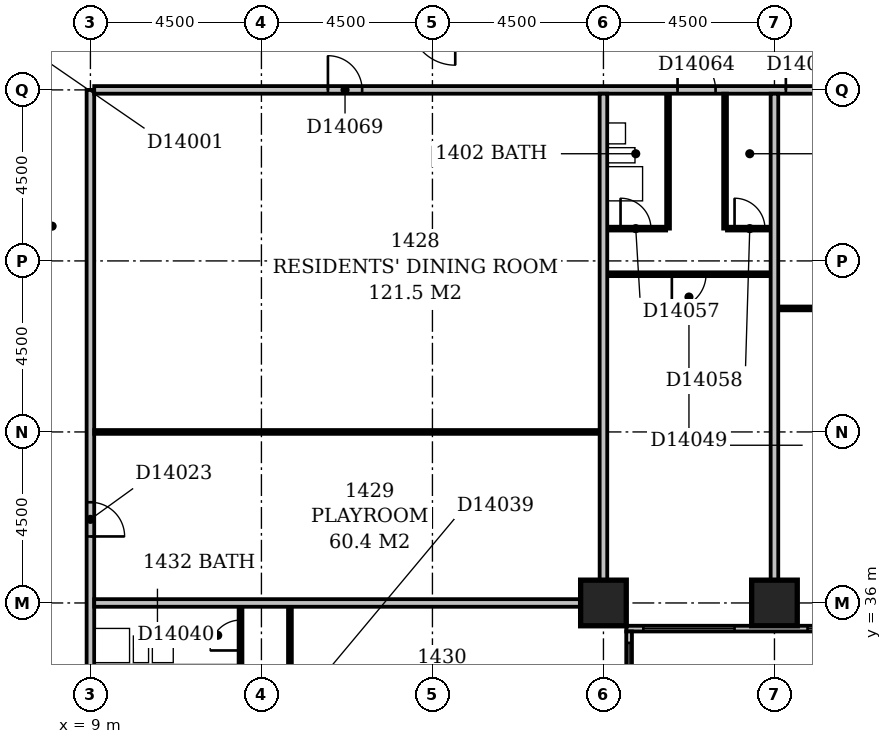
"""IFC4 building model, lengths in metres.
Left out: names, types, materials, properties, quantities, classifications, styles, units other than length and angle.
Written with IfcOpenShell. Run it as: python <this file> out.ifc"""

import sys

from ifc_helpers import new_model, si_unit, direction, frame, frame_2d, origin, origin_2d, place, context, subcontext, project, spatial, rectangle, extrude, element, fill, save


model = new_model("IFC4")
c1 = context("Model", 3, precision=1e-05, world=origin(), true_north=direction((0.0, 1.0)))
c2 = subcontext(c1, "Body", "Model", "MODEL_VIEW")
j1 = project(units=[si_unit("LENGTHUNIT", "METRE"), si_unit("PLANEANGLEUNIT", "RADIAN")], contexts=[c1])
p1 = place(None, origin())
s1 = spatial("IfcSite", under=j1, at=p1, CompositionType="ELEMENT")
p2 = place(p1, origin())
s2 = spatial("IfcBuilding", under=s1, at=p2, CompositionType="ELEMENT")
p3 = place(p2, frame((0.0, 0.0, 61.4)))
s3 = spatial("IfcBuildingStorey", under=s2, at=p3, CompositionType="ELEMENT", Elevation=61.4)
for number, where, z_axis, x_axis in (
    (1, (22.5, 36.0, -0.3), (0.0, 0.0, 1.0), (1.0, 0.0, 0.0)),
    (2, (27.0, 36.0, -0.3), (0.0, 0.0, 1.0), (1.0, 0.0, 0.0)),
):
    element("IfcColumn", number, at=place(p3, frame(where, z_axis=z_axis, x_axis=x_axis)), inside=s3, PredefinedType="COLUMN", context=c2, shape_type="SweptSolid", body=[
        extrude(rectangle(XDim=1.2, YDim=1.2, at=origin_2d()), origin(), (0.0, 0.0, 1.0), 3.6),
    ])
p4 = place(p3, frame((23.175, 17.4, 0.0), z_axis=(0.0, 0.0, 1.0), x_axis=(0.0, 1.0, 0.0)))
e3 = element("IfcWall", 3, at=p4, inside=s3, PredefinedType="STANDARD", context=c2, shape_type="SweptSolid", body=[
    extrude(rectangle(XDim=17.85, YDim=0.15, at=frame_2d((8.925, 0.0))), origin(), (0.0, 0.0, 1.0), 2.7),
])
p5 = place(p4, frame((1.65, 0.0, 0.6)))
e4 = element("IfcOpeningElement", 4, at=p5, cuts=e3, PredefinedType="OPENING", context=c2, shape_type="SweptSolid", body=[
    extrude(rectangle(XDim=2.4, YDim=1.8, at=frame_2d((1.2, 0.9))), frame((0.0, 0.087, 0.0), z_axis=(0.0, -1.0, 0.0), x_axis=(1.0, 0.0, 0.0)), (0.0, 0.0, 1.0), 0.174),
])
p6 = place(p4, frame((6.15, 0.0, 0.6)))
e5 = element("IfcOpeningElement", 5, at=p6, cuts=e3, PredefinedType="OPENING", context=c2, shape_type="SweptSolid", body=[
    extrude(rectangle(XDim=2.4, YDim=1.8, at=frame_2d((1.2, 0.9))), frame((0.0, 0.087, 0.0), z_axis=(0.0, -1.0, 0.0), x_axis=(1.0, 0.0, 0.0)), (0.0, 0.0, 1.0), 0.174),
])
p7 = place(p4, frame((11.961, 0.0, 0.6)))
e6 = element("IfcOpeningElement", 6, at=p7, cuts=e3, PredefinedType="OPENING", context=c2, shape_type="SweptSolid", body=[
    extrude(rectangle(XDim=1.2, YDim=1.8, at=frame_2d((0.6, 0.9))), frame((0.0, 0.087, 0.0), z_axis=(0.0, -1.0, 0.0), x_axis=(1.0, 0.0, 0.0)), (0.0, 0.0, 1.0), 0.174),
])
p8 = place(p4, frame((15.15, 0.0, 0.6)))
e7 = element("IfcOpeningElement", 7, at=p8, cuts=e3, PredefinedType="OPENING", context=c2, shape_type="SweptSolid", body=[
    extrude(rectangle(XDim=2.4, YDim=1.8, at=frame_2d((1.2, 0.9))), frame((0.0, 0.087, 0.0), z_axis=(0.0, -1.0, 0.0), x_axis=(1.0, 0.0, 0.0)), (0.0, 0.0, 1.0), 0.174),
])
p9 = place(p3, frame((23.1, 35.325, 0.0), z_axis=(0.0, 0.0, 1.0), x_axis=(1.0, 0.0, 0.0)))
e8 = element("IfcWall", 8, at=p9, inside=s3, PredefinedType="STANDARD", context=c2, shape_type="SweptSolid", body=[
    extrude(rectangle(XDim=45.15, YDim=0.15, at=frame_2d((22.575, 0.0))), origin(), (0.0, 0.0, 1.0), 2.7),
])
p10 = place(p9, frame((0.45, 0.0, 0.6)))
e9 = element("IfcOpeningElement", 9, at=p10, cuts=e8, PredefinedType="OPENING", context=c2, shape_type="SweptSolid", body=[
    extrude(rectangle(XDim=2.4, YDim=1.8, at=frame_2d((1.2, 0.9))), frame((0.0, 0.087, 0.0), z_axis=(0.0, -1.0, 0.0), x_axis=(1.0, 0.0, 0.0)), (0.0, 0.0, 1.0), 0.174),
])
p11 = place(p9, frame((4.77, 0.0, 0.6)))
e10 = element("IfcOpeningElement", 10, at=p11, cuts=e8, PredefinedType="OPENING", context=c2, shape_type="SweptSolid", body=[
    extrude(rectangle(XDim=2.1, YDim=1.8, at=frame_2d((1.05, 0.9))), frame((0.0, 0.087, 0.0), z_axis=(0.0, -1.0, 0.0), x_axis=(1.0, 0.0, 0.0)), (0.0, 0.0, 1.0), 0.174),
])
p12 = place(p9, frame((9.45, 0.0, 0.6)))
e11 = element("IfcOpeningElement", 11, at=p12, cuts=e8, PredefinedType="OPENING", context=c2, shape_type="SweptSolid", body=[
    extrude(rectangle(XDim=2.4, YDim=1.8, at=frame_2d((1.2, 0.9))), frame((0.0, 0.087, 0.0), z_axis=(0.0, -1.0, 0.0), x_axis=(1.0, 0.0, 0.0)), (0.0, 0.0, 1.0), 0.174),
])
p13 = place(p9, frame((13.95, 0.0, 0.6)))
e12 = element("IfcOpeningElement", 12, at=p13, cuts=e8, PredefinedType="OPENING", context=c2, shape_type="SweptSolid", body=[
    extrude(rectangle(XDim=2.4, YDim=1.8, at=frame_2d((1.2, 0.9))), frame((0.0, 0.087, 0.0), z_axis=(0.0, -1.0, 0.0), x_axis=(1.0, 0.0, 0.0)), (0.0, 0.0, 1.0), 0.174),
])
p14 = place(p9, frame((19.47, 0.0, 0.6)))
e13 = element("IfcOpeningElement", 13, at=p14, cuts=e8, PredefinedType="OPENING", context=c2, shape_type="SweptSolid", body=[
    extrude(rectangle(XDim=1.5, YDim=1.8, at=frame_2d((0.75, 0.9))), frame((0.0, 0.087, 0.0), z_axis=(0.0, -1.0, 0.0), x_axis=(1.0, 0.0, 0.0)), (0.0, 0.0, 1.0), 0.174),
])
p15 = place(p9, frame((22.95, 0.0, 0.6)))
e14 = element("IfcOpeningElement", 14, at=p15, cuts=e8, PredefinedType="OPENING", context=c2, shape_type="SweptSolid", body=[
    extrude(rectangle(XDim=2.4, YDim=1.8, at=frame_2d((1.2, 0.9))), frame((0.0, 0.087, 0.0), z_axis=(0.0, -1.0, 0.0), x_axis=(1.0, 0.0, 0.0)), (0.0, 0.0, 1.0), 0.174),
])
p16 = place(p9, frame((27.45, 0.0, 0.6)))
e15 = element("IfcOpeningElement", 15, at=p16, cuts=e8, PredefinedType="OPENING", context=c2, shape_type="SweptSolid", body=[
    extrude(rectangle(XDim=2.4, YDim=1.8, at=frame_2d((1.2, 0.9))), frame((0.0, 0.087, 0.0), z_axis=(0.0, -1.0, 0.0), x_axis=(1.0, 0.0, 0.0)), (0.0, 0.0, 1.0), 0.174),
])
p17 = place(p9, frame((31.95, 0.0, 0.6)))
e16 = element("IfcOpeningElement", 16, at=p17, cuts=e8, PredefinedType="OPENING", context=c2, shape_type="SweptSolid", body=[
    extrude(rectangle(XDim=2.4, YDim=1.8, at=frame_2d((1.2, 0.9))), frame((0.0, 0.087, 0.0), z_axis=(0.0, -1.0, 0.0), x_axis=(1.0, 0.0, 0.0)), (0.0, 0.0, 1.0), 0.174),
])
p18 = place(p9, frame((38.403, 0.0, 0.6)))
e17 = element("IfcOpeningElement", 17, at=p18, cuts=e8, PredefinedType="OPENING", context=c2, shape_type="SweptSolid", body=[
    extrude(rectangle(XDim=0.6, YDim=1.8, at=frame_2d((0.3, 0.9))), frame((0.0, 0.087, 0.0), z_axis=(0.0, -1.0, 0.0), x_axis=(1.0, 0.0, 0.0)), (0.0, 0.0, 1.0), 0.174),
])
p19 = place(p9, frame((40.95, 0.0, 0.6)))
e18 = element("IfcOpeningElement", 18, at=p19, cuts=e8, PredefinedType="OPENING", context=c2, shape_type="SweptSolid", body=[
    extrude(rectangle(XDim=2.4, YDim=1.8, at=frame_2d((1.2, 0.9))), frame((0.0, 0.087, 0.0), z_axis=(0.0, -1.0, 0.0), x_axis=(1.0, 0.0, 0.0)), (0.0, 0.0, 1.0), 0.174),
])
p20 = place(p3, frame((9.0, 5.0, 0.0), z_axis=(0.0, 0.0, 1.0), x_axis=(0.0, 1.0, 0.0)))
e19 = element("IfcWall", 19, at=p20, inside=s3, PredefinedType="PARTITIONING", context=c2, shape_type="SweptSolid", body=[
    extrude(rectangle(XDim=44.5, YDim=0.2, at=frame_2d((22.25, 0.0))), origin(), (0.0, 0.0, 1.0), 3.3),
])
p21 = place(p20, frame((28.05, 0.0, 0.0)))
e20 = element("IfcOpeningElement", 20, at=p21, cuts=e19, PredefinedType="OPENING", context=c2, shape_type="SweptSolid", body=[
    extrude(rectangle(XDim=1.0, YDim=2.1, at=frame_2d((0.5, 1.05))), frame((0.0, 0.112, 0.0), z_axis=(0.0, -1.0, 0.0), x_axis=(1.0, 0.0, 0.0)), (0.0, 0.0, 1.0), 0.224),
])
p22 = place(p20, frame((23.95, 0.0, 0.0)))
e21 = element("IfcOpeningElement", 21, at=p22, cuts=e19, PredefinedType="OPENING", context=c2, shape_type="SweptSolid", body=[
    extrude(rectangle(XDim=1.0, YDim=2.1, at=frame_2d((0.5, 1.05))), frame((0.0, 0.112, 0.0), z_axis=(0.0, -1.0, 0.0), x_axis=(1.0, 0.0, 0.0)), (0.0, 0.0, 1.0), 0.224),
])
p23 = place(p20, frame((18.3, 0.0, 0.0)))
e22 = element("IfcOpeningElement", 22, at=p23, cuts=e19, PredefinedType="OPENING", context=c2, shape_type="SweptSolid", body=[
    extrude(rectangle(XDim=1.0, YDim=2.1, at=frame_2d((0.5, 1.05))), frame((0.0, 0.112, 0.0), z_axis=(0.0, -1.0, 0.0), x_axis=(1.0, 0.0, 0.0)), (0.0, 0.0, 1.0), 0.224),
])
p24 = place(p20, frame((9.3, 0.0, 0.0)))
e23 = element("IfcOpeningElement", 23, at=p24, cuts=e19, PredefinedType="OPENING", context=c2, shape_type="SweptSolid", body=[
    extrude(rectangle(XDim=1.0, YDim=2.1, at=frame_2d((0.5, 1.05))), frame((0.0, 0.112, 0.0), z_axis=(0.0, -1.0, 0.0), x_axis=(1.0, 0.0, 0.0)), (0.0, 0.0, 1.0), 0.224),
])
p25 = place(p20, frame((32.75, 0.0, 0.0)))
e24 = element("IfcOpeningElement", 24, at=p25, cuts=e19, PredefinedType="OPENING", context=c2, shape_type="SweptSolid", body=[
    extrude(rectangle(XDim=0.9, YDim=2.1, at=frame_2d((0.45, 1.05))), frame((0.0, 0.112, 0.0), z_axis=(0.0, -1.0, 0.0), x_axis=(1.0, 0.0, 0.0)), (0.0, 0.0, 1.0), 0.224),
])
p26 = place(p20, frame((1.5, 0.0, 0.0)))
e25 = element("IfcOpeningElement", 25, at=p26, cuts=e19, PredefinedType="OPENING", context=c2, shape_type="SweptSolid", body=[
    extrude(rectangle(XDim=0.9, YDim=2.1, at=frame_2d((0.45, 1.05))), frame((0.0, 0.112, 0.0), z_axis=(0.0, -1.0, 0.0), x_axis=(1.0, 0.0, 0.0)), (0.0, 0.0, 1.0), 0.224),
])
p27 = place(p3, frame((14.25, 31.6, 0.0), z_axis=(0.0, 0.0, 1.0), x_axis=(0.0, 1.0, 0.0)))
e26 = element("IfcWall", 26, at=p27, inside=s3, PredefinedType="PARTITIONING", context=c2, shape_type="SweptSolid", body=[
    extrude(rectangle(XDim=4.3, YDim=0.1, at=frame_2d((2.15, 0.0))), origin(), (0.0, 0.0, 1.0), 3.3),
])
p28 = place(p27, frame((1.7, 0.0, 0.0)))
e27 = element("IfcOpeningElement", 27, at=p28, cuts=e26, PredefinedType="OPENING", context=c2, shape_type="SweptSolid", body=[
    extrude(rectangle(XDim=0.9, YDim=2.1, at=frame_2d((0.45, 1.05))), frame((0.0, 0.062, 0.0), z_axis=(0.0, -1.0, 0.0), x_axis=(1.0, 0.0, 0.0)), (0.0, 0.0, 1.0), 0.124),
])
p29 = place(p3, frame((12.95, 34.3, 0.0), z_axis=(0.0, 0.0, 1.0), x_axis=(0.0, 1.0, 0.0)))
e28 = element("IfcWall", 28, at=p29, inside=s3, PredefinedType="PARTITIONING", context=c2, shape_type="SweptSolid", body=[
    extrude(rectangle(XDim=1.6, YDim=0.1, at=frame_2d((0.8, 0.0))), origin(), (0.0, 0.0, 1.0), 3.3),
])
p30 = place(p29, frame((0.45, 0.0, 0.0)))
e29 = element("IfcOpeningElement", 29, at=p30, cuts=e28, PredefinedType="OPENING", context=c2, shape_type="SweptSolid", body=[
    extrude(rectangle(XDim=0.8, YDim=2.1, at=frame_2d((0.4, 1.05))), frame((0.0, 0.062, 0.0), z_axis=(0.0, -1.0, 0.0), x_axis=(1.0, 0.0, 0.0)), (0.0, 0.0, 1.0), 0.124),
])
p31 = place(p3, frame((9.1, 36.0, 0.0), z_axis=(0.0, 0.0, 1.0), x_axis=(1.0, 0.0, 0.0)))
e30 = element("IfcWall", 30, at=p31, inside=s3, PredefinedType="PARTITIONING", context=c2, shape_type="SweptSolid", body=[
    extrude(rectangle(XDim=12.8, YDim=0.2, at=frame_2d((6.4, 0.0))), origin(), (0.0, 0.0, 1.0), 2.4),
])
p32 = place(p3, frame((22.5, 36.6, 0.0), z_axis=(0.0, 0.0, 1.0), x_axis=(0.0, 1.0, 0.0)))
e31 = element("IfcWall", 31, at=p32, inside=s3, PredefinedType="PARTITIONING", context=c2, shape_type="SweptSolid", body=[
    extrude(rectangle(XDim=12.8, YDim=0.2, at=frame_2d((6.4, 0.0))), origin(), (0.0, 0.0, 1.0), 3.3),
])
p33 = place(p3, frame((27.0, 36.6, 0.0), z_axis=(0.0, 0.0, 1.0), x_axis=(0.0, 1.0, 0.0)))
e32 = element("IfcWall", 32, at=p33, inside=s3, PredefinedType="PARTITIONING", context=c2, shape_type="SweptSolid", body=[
    extrude(rectangle(XDim=12.8, YDim=0.2, at=frame_2d((6.4, 0.0))), origin(), (0.0, 0.0, 1.0), 2.6),
])
p34 = place(p3, frame((9.1, 40.5, 0.0), z_axis=(0.0, 0.0, 1.0), x_axis=(1.0, 0.0, 0.0)))
e33 = element("IfcWall", 33, at=p34, inside=s3, PredefinedType="PARTITIONING", context=c2, shape_type="SweptSolid", body=[
    extrude(rectangle(XDim=13.3, YDim=0.1, at=frame_2d((6.65, 0.0))), origin(), (0.0, 0.0, 1.0), 3.3),
])
p35 = place(p3, frame((27.1, 43.75, 0.0), z_axis=(0.0, 0.0, 1.0), x_axis=(1.0, 0.0, 0.0)))
e34 = element("IfcWall", 34, at=p35, inside=s3, PredefinedType="PARTITIONING", context=c2, shape_type="SweptSolid", body=[
    extrude(rectangle(XDim=13.3, YDim=0.1, at=frame_2d((6.65, 0.0))), origin(), (0.0, 0.0, 1.0), 3.3),
])
p36 = place(p35, frame((3.9, 0.0, 0.0)))
e35 = element("IfcOpeningElement", 35, at=p36, cuts=e34, PredefinedType="OPENING", context=c2, shape_type="SweptSolid", body=[
    extrude(rectangle(XDim=0.9, YDim=2.1, at=frame_2d((0.45, 1.05))), frame((0.0, 0.062, 0.0), z_axis=(0.0, -1.0, 0.0), x_axis=(1.0, 0.0, 0.0)), (0.0, 0.0, 1.0), 0.124),
])
p37 = place(p35, frame((10.7, 0.0, 0.0)))
e36 = element("IfcOpeningElement", 36, at=p37, cuts=e34, PredefinedType="OPENING", context=c2, shape_type="SweptSolid", body=[
    extrude(rectangle(XDim=0.9, YDim=2.1, at=frame_2d((0.45, 1.05))), frame((0.0, 0.062, 0.0), z_axis=(0.0, -1.0, 0.0), x_axis=(1.0, 0.0, 0.0)), (0.0, 0.0, 1.0), 0.124),
])
p38 = place(p3, frame((22.6, 44.65, 0.0), z_axis=(0.0, 0.0, 1.0), x_axis=(1.0, 0.0, 0.0)))
e37 = element("IfcWall", 37, at=p38, inside=s3, PredefinedType="PARTITIONING", context=c2, shape_type="SweptSolid", body=[
    extrude(rectangle(XDim=4.3, YDim=0.1, at=frame_2d((2.15, 0.0))), origin(), (0.0, 0.0, 1.0), 3.3),
])
p39 = place(p38, frame((1.7, 0.0, 0.0)))
e38 = element("IfcOpeningElement", 38, at=p39, cuts=e37, PredefinedType="OPENING", context=c2, shape_type="SweptSolid", body=[
    extrude(rectangle(XDim=0.9, YDim=2.1, at=frame_2d((0.45, 1.05))), frame((0.0, 0.062, 0.0), z_axis=(0.0, -1.0, 0.0), x_axis=(1.0, 0.0, 0.0)), (0.0, 0.0, 1.0), 0.124),
])
p40 = place(p3, frame((22.6, 45.85, 0.0), z_axis=(0.0, 0.0, 1.0), x_axis=(1.0, 0.0, 0.0)))
e39 = element("IfcWall", 39, at=p40, inside=s3, PredefinedType="PARTITIONING", context=c2, shape_type="SweptSolid", body=[
    extrude(rectangle(XDim=1.55, YDim=0.1, at=frame_2d((0.775, 0.0))), origin(), (0.0, 0.0, 1.0), 3.3),
])
p41 = place(p40, frame((0.35, 0.0, 0.0)))
e40 = element("IfcOpeningElement", 40, at=p41, cuts=e39, PredefinedType="OPENING", context=c2, shape_type="SweptSolid", body=[
    extrude(rectangle(XDim=0.8, YDim=2.1, at=frame_2d((0.4, 1.05))), frame((0.0, 0.062, 0.0), z_axis=(0.0, -1.0, 0.0), x_axis=(1.0, 0.0, 0.0)), (0.0, 0.0, 1.0), 0.124),
])
p42 = place(p3, frame((24.2, 45.85, 0.0), z_axis=(0.0, 0.0, 1.0), x_axis=(0.0, 1.0, 0.0)))
e41 = element("IfcWall", 41, at=p42, inside=s3, PredefinedType="PLUMBINGWALL", context=c2, shape_type="SweptSolid", body=[
    extrude(rectangle(XDim=3.55, YDim=0.1, at=frame_2d((1.775, 0.0))), origin(), (0.0, 0.0, 1.0), 3.3),
])
p43 = place(p3, frame((25.7, 45.85, 0.0), z_axis=(0.0, 0.0, 1.0), x_axis=(0.0, 1.0, 0.0)))
e42 = element("IfcWall", 42, at=p43, inside=s3, PredefinedType="PARTITIONING", context=c2, shape_type="SweptSolid", body=[
    extrude(rectangle(XDim=3.55, YDim=0.1, at=frame_2d((1.775, 0.0))), origin(), (0.0, 0.0, 1.0), 3.3),
])
p44 = place(p3, frame((25.75, 45.85, 0.0), z_axis=(0.0, 0.0, 1.0), x_axis=(1.0, 0.0, 0.0)))
e43 = element("IfcWall", 43, at=p44, inside=s3, PredefinedType="PARTITIONING", context=c2, shape_type="SweptSolid", body=[
    extrude(rectangle(XDim=1.15, YDim=0.1, at=frame_2d((0.575, 0.0))), origin(), (0.0, 0.0, 1.0), 3.3),
])
p45 = place(p44, frame((0.2, 0.0, 0.0)))
e44 = element("IfcOpeningElement", 44, at=p45, cuts=e43, PredefinedType="OPENING", context=c2, shape_type="SweptSolid", body=[
    extrude(rectangle(XDim=0.8, YDim=2.1, at=frame_2d((0.4, 1.05))), frame((0.0, 0.062, 0.0), z_axis=(0.0, -1.0, 0.0), x_axis=(1.0, 0.0, 0.0)), (0.0, 0.0, 1.0), 0.124),
])
p46 = place(p3, frame((9.1, 49.5, 0.0), z_axis=(0.0, 0.0, 1.0), x_axis=(1.0, 0.0, 0.0)))
e45 = element("IfcWall", 45, at=p46, inside=s3, PredefinedType="PARTITIONING", context=c2, shape_type="SweptSolid", body=[
    extrude(rectangle(XDim=57.8, YDim=0.2, at=frame_2d((28.9, 0.0))), origin(), (0.0, 0.0, 1.0), 3.3),
])
p47 = place(p46, frame((15.35, 0.0, 0.0)))
e46 = element("IfcOpeningElement", 46, at=p47, cuts=e45, PredefinedType="OPENING", context=c2, shape_type="SweptSolid", body=[
    extrude(rectangle(XDim=1.0, YDim=2.1, at=frame_2d((0.5, 1.05))), frame((0.0, 0.112, 0.0), z_axis=(0.0, -1.0, 0.0), x_axis=(1.0, 0.0, 0.0)), (0.0, 0.0, 1.0), 0.224),
])
p48 = place(p46, frame((18.2, 0.0, 0.0)))
e47 = element("IfcOpeningElement", 47, at=p48, cuts=e45, PredefinedType="OPENING", context=c2, shape_type="SweptSolid", body=[
    extrude(rectangle(XDim=1.0, YDim=2.1, at=frame_2d((0.5, 1.05))), frame((0.0, 0.112, 0.0), z_axis=(0.0, -1.0, 0.0), x_axis=(1.0, 0.0, 0.0)), (0.0, 0.0, 1.0), 0.224),
])
p49 = place(p46, frame((39.6, 0.0, 0.0)))
e48 = element("IfcOpeningElement", 48, at=p49, cuts=e45, PredefinedType="OPENING", context=c2, shape_type="SweptSolid", body=[
    extrude(rectangle(XDim=1.0, YDim=2.1, at=frame_2d((0.5, 1.05))), frame((0.0, 0.112, 0.0), z_axis=(0.0, -1.0, 0.0), x_axis=(1.0, 0.0, 0.0)), (0.0, 0.0, 1.0), 0.224),
])
p50 = place(p46, frame((45.2, 0.0, 0.0)))
e49 = element("IfcOpeningElement", 49, at=p50, cuts=e45, PredefinedType="OPENING", context=c2, shape_type="SweptSolid", body=[
    extrude(rectangle(XDim=1.0, YDim=2.1, at=frame_2d((0.5, 1.05))), frame((0.0, 0.112, 0.0), z_axis=(0.0, -1.0, 0.0), x_axis=(1.0, 0.0, 0.0)), (0.0, 0.0, 1.0), 0.224),
])
p51 = place(p46, frame((54.15, 0.0, 0.0)))
e50 = element("IfcOpeningElement", 50, at=p51, cuts=e45, PredefinedType="OPENING", context=c2, shape_type="SweptSolid", body=[
    extrude(rectangle(XDim=1.0, YDim=2.1, at=frame_2d((0.5, 1.05))), frame((0.0, 0.112, 0.0), z_axis=(0.0, -1.0, 0.0), x_axis=(1.0, 0.0, 0.0)), (0.0, 0.0, 1.0), 0.224),
])
p52 = place(p46, frame((6.15, 0.0, 0.0)))
e51 = element("IfcOpeningElement", 51, at=p52, cuts=e45, PredefinedType="OPENING", context=c2, shape_type="SweptSolid", body=[
    extrude(rectangle(XDim=0.9, YDim=2.1, at=frame_2d((0.45, 1.05))), frame((0.0, 0.112, 0.0), z_axis=(0.0, -1.0, 0.0), x_axis=(1.0, 0.0, 0.0)), (0.0, 0.0, 1.0), 0.224),
])
p53 = place(p8, origin())
e52 = element("IfcWindow", 52, at=p53, inside=s3, PartitioningType="SINGLE_PANEL", PredefinedType="WINDOW", context=c2, shape_type="SweptSolid", body=[
    extrude(rectangle(XDim=2.4, YDim=1.8, at=frame_2d((1.2, 0.9))), frame((0.0, 0.03, 0.0), z_axis=(0.0, -1.0, 0.0), x_axis=(1.0, 0.0, 0.0)), (0.0, 0.0, 1.0), 0.06),
])
fill(e7, e52)
p54 = place(p10, origin())
e53 = element("IfcWindow", 53, at=p54, inside=s3, PartitioningType="SINGLE_PANEL", PredefinedType="WINDOW", context=c2, shape_type="SweptSolid", body=[
    extrude(rectangle(XDim=2.4, YDim=1.8, at=frame_2d((1.2, 0.9))), frame((0.0, 0.03, 0.0), z_axis=(0.0, -1.0, 0.0), x_axis=(1.0, 0.0, 0.0)), (0.0, 0.0, 1.0), 0.06),
])
fill(e9, e53)
p55 = place(p11, origin())
e54 = element("IfcWindow", 54, at=p55, inside=s3, PartitioningType="SINGLE_PANEL", PredefinedType="WINDOW", context=c2, shape_type="SweptSolid", body=[
    extrude(rectangle(XDim=2.1, YDim=1.8, at=frame_2d((1.05, 0.9))), frame((0.0, 0.03, 0.0), z_axis=(0.0, -1.0, 0.0), x_axis=(1.0, 0.0, 0.0)), (0.0, 0.0, 1.0), 0.06),
])
fill(e10, e54)
p56 = place(p25, frame((0.9, 0.0, 0.0), z_axis=(0.0, 0.0, 1.0), x_axis=(-1.0, 0.0, 0.0)))
e55 = element("IfcDoor", 55, at=p56, inside=s3, OperationType="SINGLE_SWING_RIGHT", PredefinedType="DOOR", context=c2, shape_type="SweptSolid", body=[
    extrude(rectangle(XDim=0.9, YDim=2.1, at=frame_2d((0.45, 1.05))), frame((0.0, 0.025, 0.0), z_axis=(0.0, -1.0, 0.0), x_axis=(1.0, 0.0, 0.0)), (0.0, 0.0, 1.0), 0.05),
])
fill(e24, e55)
p57 = place(p30, origin())
e56 = element("IfcDoor", 56, at=p57, inside=s3, OperationType="SINGLE_SWING_LEFT", PredefinedType="DOOR", context=c2, shape_type="SweptSolid", body=[
    extrude(rectangle(XDim=0.8, YDim=2.1, at=frame_2d((0.4, 1.05))), frame((0.0, 0.025, 0.0), z_axis=(0.0, -1.0, 0.0), x_axis=(1.0, 0.0, 0.0)), (0.0, 0.0, 1.0), 0.05),
])
fill(e29, e56)
p58 = place(p39, frame((0.9, 0.0, 0.0), z_axis=(0.0, 0.0, 1.0), x_axis=(-1.0, 0.0, 0.0)))
e57 = element("IfcDoor", 57, at=p58, inside=s3, OperationType="SINGLE_SWING_RIGHT", PredefinedType="DOOR", context=c2, shape_type="SweptSolid", body=[
    extrude(rectangle(XDim=0.9, YDim=2.1, at=frame_2d((0.45, 1.05))), frame((0.0, 0.025, 0.0), z_axis=(0.0, -1.0, 0.0), x_axis=(1.0, 0.0, 0.0)), (0.0, 0.0, 1.0), 0.05),
])
fill(e38, e57)
p59 = place(p41, origin())
e58 = element("IfcDoor", 58, at=p59, inside=s3, OperationType="SINGLE_SWING_LEFT", PredefinedType="DOOR", context=c2, shape_type="SweptSolid", body=[
    extrude(rectangle(XDim=0.8, YDim=2.1, at=frame_2d((0.4, 1.05))), frame((0.0, 0.025, 0.0), z_axis=(0.0, -1.0, 0.0), x_axis=(1.0, 0.0, 0.0)), (0.0, 0.0, 1.0), 0.05),
])
fill(e40, e58)
p60 = place(p45, origin())
e59 = element("IfcDoor", 59, at=p60, inside=s3, OperationType="SINGLE_SWING_LEFT", PredefinedType="DOOR", context=c2, shape_type="SweptSolid", body=[
    extrude(rectangle(XDim=0.8, YDim=2.1, at=frame_2d((0.4, 1.05))), frame((0.0, 0.025, 0.0), z_axis=(0.0, -1.0, 0.0), x_axis=(1.0, 0.0, 0.0)), (0.0, 0.0, 1.0), 0.05),
])
fill(e44, e59)
p61 = place(p47, origin())
e60 = element("IfcDoor", 60, at=p61, inside=s3, OperationType="SINGLE_SWING_LEFT", PredefinedType="DOOR", context=c2, shape_type="SweptSolid", body=[
    extrude(rectangle(XDim=1.0, YDim=2.1, at=frame_2d((0.5, 1.05))), frame((0.0, 0.025, 0.0), z_axis=(0.0, -1.0, 0.0), x_axis=(1.0, 0.0, 0.0)), (0.0, 0.0, 1.0), 0.05),
])
fill(e46, e60)
p62 = place(p48, origin())
e61 = element("IfcDoor", 61, at=p62, inside=s3, OperationType="SINGLE_SWING_LEFT", PredefinedType="DOOR", context=c2, shape_type="SweptSolid", body=[
    extrude(rectangle(XDim=1.0, YDim=2.1, at=frame_2d((0.5, 1.05))), frame((0.0, 0.025, 0.0), z_axis=(0.0, -1.0, 0.0), x_axis=(1.0, 0.0, 0.0)), (0.0, 0.0, 1.0), 0.05),
])
fill(e47, e61)
p63 = place(p52, origin())
e62 = element("IfcDoor", 62, at=p63, inside=s3, OperationType="SINGLE_SWING_LEFT", PredefinedType="DOOR", context=c2, shape_type="SweptSolid", body=[
    extrude(rectangle(XDim=0.9, YDim=2.1, at=frame_2d((0.45, 1.05))), frame((0.0, 0.025, 0.0), z_axis=(0.0, -1.0, 0.0), x_axis=(1.0, 0.0, 0.0)), (0.0, 0.0, 1.0), 0.05),
])
fill(e51, e62)
save(model, sys.argv[1])
